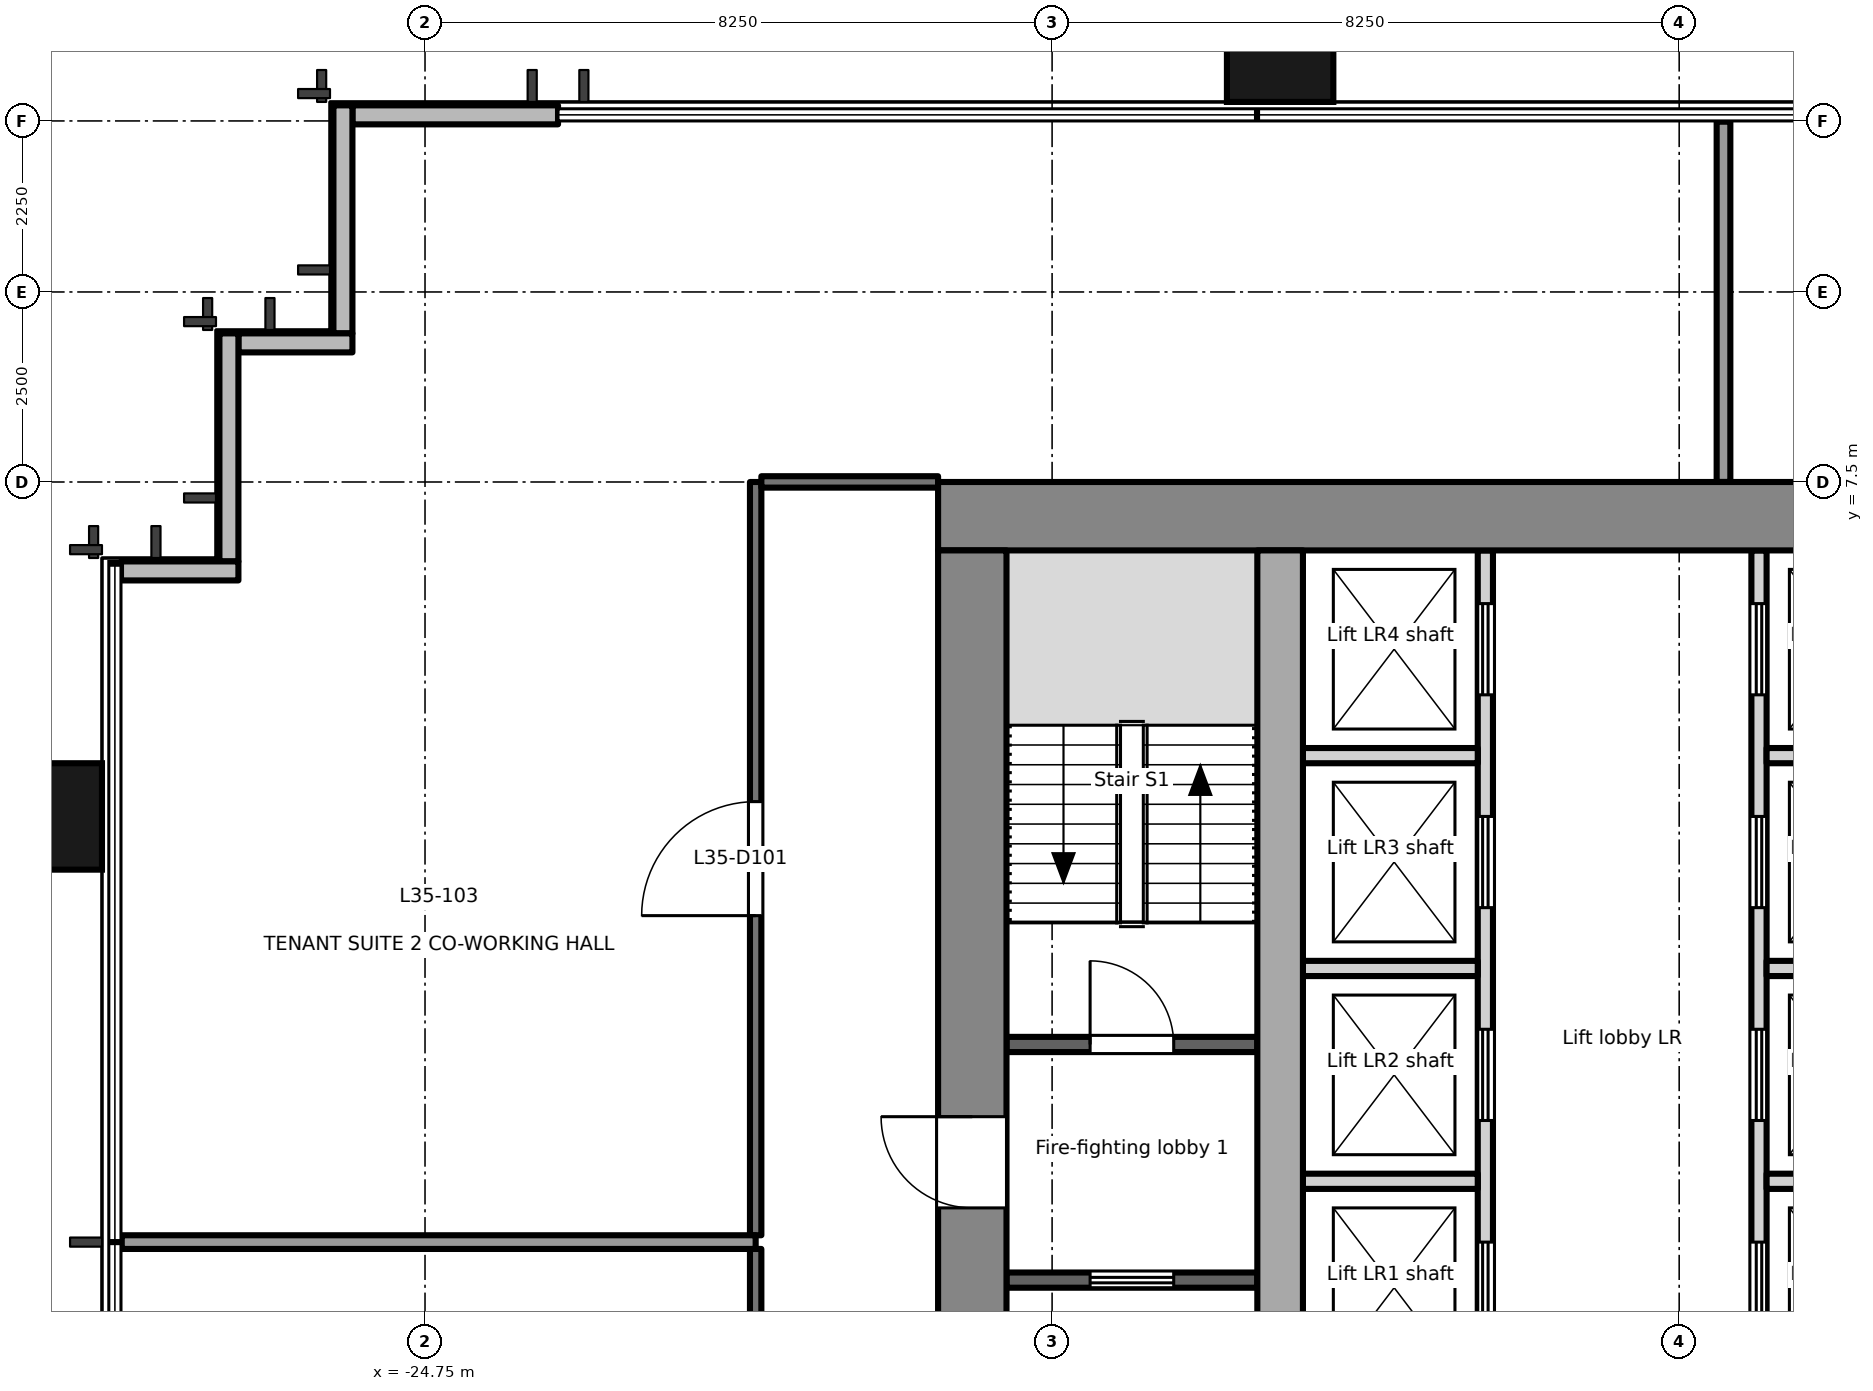
"""IFC4 building model, lengths in metres.
Left out: names, types, materials, properties, quantities, classifications, styles, units other than length and angle.
Written with IfcOpenShell. Run it as: python <this file> out.ifc"""

import sys

from ifc_helpers import new_model, si_unit, direction, frame, frame_2d, origin, origin_2d, place, context, subcontext, project, spatial, rectangle, extrude, element, fill, save


model = new_model("IFC4")
c1 = context("Model", 3, precision=1e-05, world=origin(), true_north=direction((0.0, 1.0)))
c2 = subcontext(c1, "Body", "Model", "MODEL_VIEW")
j1 = project(units=[si_unit("LENGTHUNIT", "METRE"), si_unit("PLANEANGLEUNIT", "RADIAN")], contexts=[c1])
p1 = place(None, origin())
s1 = spatial("IfcSite", under=j1, at=p1, CompositionType="ELEMENT")
p2 = place(p1, origin())
s2 = spatial("IfcBuilding", under=s1, at=p2, CompositionType="ELEMENT")
p3 = place(p2, frame((0.0, 0.0, 154.1)))
s3 = spatial("IfcBuildingStorey", under=s2, at=p3, CompositionType="ELEMENT", Elevation=154.1)
for number, where, z_axis, x_axis in (
    (1, (-29.9, 3.1, -0.2), (0.0, 0.0, 1.0), (0.0, 1.0, 0.0)),
    (2, (-13.5, 13.4, -0.2), (0.0, 0.0, 1.0), (1.0, 0.0, 0.0)),
):
    element("IfcColumn", number, at=place(p3, frame(where, z_axis=z_axis, x_axis=x_axis)), inside=s3, PredefinedType="COLUMN", context=c2, shape_type="SweptSolid", body=[
        extrude(rectangle(XDim=1.4, YDim=1.8, at=origin_2d()), origin(), (0.0, 0.0, 1.0), 4.0),
    ])
p4 = place(p3, frame((-23.0, 12.33, 0.0), z_axis=(0.0, 0.0, 1.0), x_axis=(-1.0, 0.0, 0.0)))
e3 = element("IfcWall", 3, at=p4, inside=s3, PredefinedType="SOLIDWALL", context=c2, shape_type="SweptSolid", body=[
    extrude(rectangle(XDim=2.705, YDim=0.25, at=frame_2d((1.353, 0.0))), origin(), (0.0, 0.0, 1.0), 3.8),
])
p5 = place(p3, frame((-25.83, 12.455, 0.0), z_axis=(0.0, 0.0, 1.0), x_axis=(0.0, -1.0, 0.0)))
e4 = element("IfcWall", 4, at=p5, inside=s3, PredefinedType="SOLIDWALL", context=c2, shape_type="SweptSolid", body=[
    extrude(rectangle(XDim=3.0, YDim=0.25, at=frame_2d((1.5, 0.0))), origin(), (0.0, 0.0, 1.0), 3.8),
])
p6 = place(p3, frame((-25.705, 9.33, 0.0), z_axis=(0.0, 0.0, 1.0), x_axis=(-1.0, 0.0, 0.0)))
e5 = element("IfcWall", 5, at=p6, inside=s3, PredefinedType="SOLIDWALL", context=c2, shape_type="SweptSolid", body=[
    extrude(rectangle(XDim=1.5, YDim=0.25, at=frame_2d((0.75, 0.0))), origin(), (0.0, 0.0, 1.0), 3.8),
])
p7 = place(p3, frame((-27.33, 9.455, 0.0), z_axis=(0.0, 0.0, 1.0), x_axis=(0.0, -1.0, 0.0)))
e6 = element("IfcWall", 6, at=p7, inside=s3, PredefinedType="SOLIDWALL", context=c2, shape_type="SweptSolid", body=[
    extrude(rectangle(XDim=3.0, YDim=0.25, at=frame_2d((1.5, 0.0))), origin(), (0.0, 0.0, 1.0), 3.8),
])
p8 = place(p3, frame((-27.205, 6.33, 0.0), z_axis=(0.0, 0.0, 1.0), x_axis=(-1.0, 0.0, 0.0)))
e7 = element("IfcWall", 7, at=p8, inside=s3, PredefinedType="SOLIDWALL", context=c2, shape_type="SweptSolid", body=[
    extrude(rectangle(XDim=1.545, YDim=0.25, at=frame_2d((0.772, 0.0))), origin(), (0.0, 0.0, 1.0), 3.8),
])
p9 = place(p3, frame((-18.0, 7.05, -0.2), z_axis=(0.0, 0.0, 1.0), x_axis=(1.0, 0.0, 0.0)))
e8 = element("IfcWall", 8, at=p9, inside=s3, PredefinedType="SHEAR", context=c2, shape_type="SweptSolid", body=[
    extrude(rectangle(XDim=36.0, YDim=0.9, at=frame_2d((18.0, 0.0))), origin(), (0.0, 0.0, 1.0), 4.0),
])
p10 = place(p3, frame((-17.55, -6.6, -0.2), z_axis=(0.0, 0.0, 1.0), x_axis=(0.0, 1.0, 0.0)))
e9 = element("IfcWall", 9, at=p10, inside=s3, PredefinedType="SHEAR", context=c2, shape_type="SweptSolid", body=[
    extrude(rectangle(XDim=13.2, YDim=0.9, at=frame_2d((6.6, 0.0))), origin(), (0.0, 0.0, 1.0), 4.0),
])
p11 = place(p10, frame((4.55, 0.0, 0.2)))
e10 = element("IfcOpeningElement", 10, at=p11, cuts=e9, PredefinedType="OPENING", context=c2, shape_type="SweptSolid", body=[
    extrude(rectangle(XDim=1.2, YDim=2.1, at=frame_2d((0.6, 1.05))), frame((0.0, 0.46, 0.0), z_axis=(0.0, -1.0, 0.0), x_axis=(1.0, 0.0, 0.0)), (0.0, 0.0, 1.0), 0.921),
])
p12 = place(p3, frame((-13.5, -6.6, -0.2), z_axis=(0.0, 0.0, 1.0), x_axis=(0.0, 1.0, 0.0)))
e11 = element("IfcWall", 11, at=p12, inside=s3, PredefinedType="SHEAR", context=c2, shape_type="SweptSolid", body=[
    extrude(rectangle(XDim=13.2, YDim=0.6, at=frame_2d((6.6, 0.0))), origin(), (0.0, 0.0, 1.0), 4.0),
])
p13 = place(p3, frame((-17.1, -3.0, 0.0), z_axis=(0.0, 0.0, 1.0), x_axis=(1.0, 0.0, 0.0)))
e12 = element("IfcWall", 12, at=p13, inside=s3, PredefinedType="PARTITIONING", context=c2, shape_type="SweptSolid", body=[
    extrude(rectangle(XDim=3.3, YDim=0.2, at=frame_2d((1.65, 0.0))), origin(), (0.0, 0.0, 1.0), 3.8),
])
p14 = place(p13, frame((1.1, 0.0, 0.0)))
e13 = element("IfcOpeningElement", 13, at=p14, cuts=e12, PredefinedType="OPENING", context=c2, shape_type="SweptSolid", body=[
    extrude(rectangle(XDim=1.1, YDim=2.1, at=frame_2d((0.55, 1.05))), frame((0.0, 0.111, 0.0), z_axis=(0.0, -1.0, 0.0), x_axis=(1.0, 0.0, 0.0)), (0.0, 0.0, 1.0), 0.221),
])
p15 = place(p3, frame((-17.1, 0.1, 0.0), z_axis=(0.0, 0.0, 1.0), x_axis=(1.0, 0.0, 0.0)))
e14 = element("IfcWall", 14, at=p15, inside=s3, PredefinedType="PARTITIONING", context=c2, shape_type="SweptSolid", body=[
    extrude(rectangle(XDim=3.3, YDim=0.2, at=frame_2d((1.65, 0.0))), origin(), (0.0, 0.0, 1.0), 3.8),
])
p16 = place(p15, frame((1.1, 0.0, 0.0)))
e15 = element("IfcOpeningElement", 15, at=p16, cuts=e14, PredefinedType="OPENING", context=c2, shape_type="SweptSolid", body=[
    extrude(rectangle(XDim=1.1, YDim=2.1, at=frame_2d((0.55, 1.05))), frame((0.0, 0.111, 0.0), z_axis=(0.0, -1.0, 0.0), x_axis=(1.0, 0.0, 0.0)), (0.0, 0.0, 1.0), 0.221),
])
p17 = place(p3, frame((-10.8, -6.6, 0.0), z_axis=(0.0, 0.0, 1.0), x_axis=(0.0, 1.0, 0.0)))
e16 = element("IfcWall", 16, at=p17, inside=s3, PredefinedType="PARTITIONING", context=c2, shape_type="SweptSolid", body=[
    extrude(rectangle(XDim=13.2, YDim=0.2, at=frame_2d((6.6, 0.0))), origin(), (0.0, 0.0, 1.0), 3.8),
])
p18 = place(p17, frame((0.55, 0.0, 0.0)))
e17 = element("IfcOpeningElement", 17, at=p18, cuts=e16, PredefinedType="OPENING", context=c2, shape_type="SweptSolid", body=[
    extrude(rectangle(XDim=0.9, YDim=2.1, at=frame_2d((0.45, 1.05))), frame((0.0, 0.111, 0.0), z_axis=(0.0, -1.0, 0.0), x_axis=(1.0, 0.0, 0.0)), (0.0, 0.0, 1.0), 0.221),
])
p19 = place(p17, frame((2.9, 0.0, 0.0)))
e18 = element("IfcOpeningElement", 18, at=p19, cuts=e16, PredefinedType="OPENING", context=c2, shape_type="SweptSolid", body=[
    extrude(rectangle(XDim=1.2, YDim=2.1, at=frame_2d((0.6, 1.05))), frame((0.0, 0.111, 0.0), z_axis=(0.0, -1.0, 0.0), x_axis=(1.0, 0.0, 0.0)), (0.0, 0.0, 1.0), 0.221),
])
p20 = place(p17, frame((5.7, 0.0, 0.0)))
e19 = element("IfcOpeningElement", 19, at=p20, cuts=e16, PredefinedType="OPENING", context=c2, shape_type="SweptSolid", body=[
    extrude(rectangle(XDim=1.2, YDim=2.1, at=frame_2d((0.6, 1.05))), frame((0.0, 0.111, 0.0), z_axis=(0.0, -1.0, 0.0), x_axis=(1.0, 0.0, 0.0)), (0.0, 0.0, 1.0), 0.221),
])
p21 = place(p17, frame((8.5, 0.0, 0.0)))
e20 = element("IfcOpeningElement", 20, at=p21, cuts=e16, PredefinedType="OPENING", context=c2, shape_type="SweptSolid", body=[
    extrude(rectangle(XDim=1.2, YDim=2.1, at=frame_2d((0.6, 1.05))), frame((0.0, 0.111, 0.0), z_axis=(0.0, -1.0, 0.0), x_axis=(1.0, 0.0, 0.0)), (0.0, 0.0, 1.0), 0.221),
])
p22 = place(p17, frame((11.3, 0.0, 0.0)))
e21 = element("IfcOpeningElement", 21, at=p22, cuts=e16, PredefinedType="OPENING", context=c2, shape_type="SweptSolid", body=[
    extrude(rectangle(XDim=1.2, YDim=2.1, at=frame_2d((0.6, 1.05))), frame((0.0, 0.111, 0.0), z_axis=(0.0, -1.0, 0.0), x_axis=(1.0, 0.0, 0.0)), (0.0, 0.0, 1.0), 0.221),
])
p23 = place(p3, frame((-7.2, -6.6, 0.0), z_axis=(0.0, 0.0, 1.0), x_axis=(0.0, 1.0, 0.0)))
e22 = element("IfcWall", 22, at=p23, inside=s3, PredefinedType="PARTITIONING", context=c2, shape_type="SweptSolid", body=[
    extrude(rectangle(XDim=13.2, YDim=0.2, at=frame_2d((6.6, 0.0))), origin(), (0.0, 0.0, 1.0), 3.8),
])
p24 = place(p23, frame((0.55, 0.0, 0.0)))
e23 = element("IfcOpeningElement", 23, at=p24, cuts=e22, PredefinedType="OPENING", context=c2, shape_type="SweptSolid", body=[
    extrude(rectangle(XDim=0.9, YDim=2.1, at=frame_2d((0.45, 1.05))), frame((0.0, 0.111, 0.0), z_axis=(0.0, -1.0, 0.0), x_axis=(1.0, 0.0, 0.0)), (0.0, 0.0, 1.0), 0.221),
])
p25 = place(p23, frame((2.9, 0.0, 0.0)))
e24 = element("IfcOpeningElement", 24, at=p25, cuts=e22, PredefinedType="OPENING", context=c2, shape_type="SweptSolid", body=[
    extrude(rectangle(XDim=1.2, YDim=2.1, at=frame_2d((0.6, 1.05))), frame((0.0, 0.111, 0.0), z_axis=(0.0, -1.0, 0.0), x_axis=(1.0, 0.0, 0.0)), (0.0, 0.0, 1.0), 0.221),
])
p26 = place(p23, frame((5.7, 0.0, 0.0)))
e25 = element("IfcOpeningElement", 25, at=p26, cuts=e22, PredefinedType="OPENING", context=c2, shape_type="SweptSolid", body=[
    extrude(rectangle(XDim=1.2, YDim=2.1, at=frame_2d((0.6, 1.05))), frame((0.0, 0.111, 0.0), z_axis=(0.0, -1.0, 0.0), x_axis=(1.0, 0.0, 0.0)), (0.0, 0.0, 1.0), 0.221),
])
p27 = place(p23, frame((8.5, 0.0, 0.0)))
e26 = element("IfcOpeningElement", 26, at=p27, cuts=e22, PredefinedType="OPENING", context=c2, shape_type="SweptSolid", body=[
    extrude(rectangle(XDim=1.2, YDim=2.1, at=frame_2d((0.6, 1.05))), frame((0.0, 0.111, 0.0), z_axis=(0.0, -1.0, 0.0), x_axis=(1.0, 0.0, 0.0)), (0.0, 0.0, 1.0), 0.221),
])
p28 = place(p23, frame((11.3, 0.0, 0.0)))
e27 = element("IfcOpeningElement", 27, at=p28, cuts=e22, PredefinedType="OPENING", context=c2, shape_type="SweptSolid", body=[
    extrude(rectangle(XDim=1.2, YDim=2.1, at=frame_2d((0.6, 1.05))), frame((0.0, 0.111, 0.0), z_axis=(0.0, -1.0, 0.0), x_axis=(1.0, 0.0, 0.0)), (0.0, 0.0, 1.0), 0.221),
])
for number, where, z_axis, x_axis in (
    (28, (-13.2, -1.7, 0.0), (0.0, 0.0, 1.0), (1.0, 0.0, 0.0)),
    (29, (-13.2, 1.1, 0.0), (0.0, 0.0, 1.0), (1.0, 0.0, 0.0)),
    (30, (-13.2, 3.9, 0.0), (0.0, 0.0, 1.0), (1.0, 0.0, 0.0)),
    (31, (-7.1, -1.7, 0.0), (0.0, 0.0, 1.0), (1.0, 0.0, 0.0)),
    (32, (-7.1, 1.1, 0.0), (0.0, 0.0, 1.0), (1.0, 0.0, 0.0)),
    (33, (-7.1, 3.9, 0.0), (0.0, 0.0, 1.0), (1.0, 0.0, 0.0)),
):
    element("IfcWall", number, at=place(p3, frame(where, z_axis=z_axis, x_axis=x_axis)), inside=s3, PredefinedType="PARTITIONING", context=c2, shape_type="SweptSolid", body=[
        extrude(rectangle(XDim=2.3, YDim=0.2, at=frame_2d((1.15, 0.0))), origin(), (0.0, 0.0, 1.0), 3.8),
    ])
p29 = place(p3, frame((-20.4, -10.78, 0.0), z_axis=(0.0, 0.0, 1.0), x_axis=(0.0, 1.0, 0.0)))
e34 = element("IfcWall", 34, at=p29, inside=s3, PredefinedType="PARTITIONING", context=c2, shape_type="SweptSolid", body=[
    extrude(rectangle(XDim=8.19, YDim=0.15, at=frame_2d((4.095, 0.0))), origin(), (0.0, 0.0, 1.0), 3.3),
])
p30 = place(p29, frame((3.645, 0.0, 0.0)))
e35 = element("IfcOpeningElement", 35, at=p30, cuts=e34, PredefinedType="OPENING", context=c2, shape_type="SweptSolid", body=[
    extrude(rectangle(XDim=0.9, YDim=2.1, at=frame_2d((0.45, 1.05))), frame((0.0, 0.085, 0.0), z_axis=(0.0, -1.0, 0.0), x_axis=(1.0, 0.0, 0.0)), (0.0, 0.0, 1.0), 0.171),
])
p31 = place(p3, frame((-20.4, -2.41, 0.0), z_axis=(0.0, 0.0, 1.0), x_axis=(0.0, 1.0, 0.0)))
e36 = element("IfcWall", 36, at=p31, inside=s3, PredefinedType="PARTITIONING", context=c2, shape_type="SweptSolid", body=[
    extrude(rectangle(XDim=9.91, YDim=0.15, at=frame_2d((4.955, 0.0))), origin(), (0.0, 0.0, 1.0), 3.3),
])
p32 = place(p31, frame((4.205, 0.0, 0.0)))
e37 = element("IfcOpeningElement", 37, at=p32, cuts=e36, PredefinedType="OPENING", context=c2, shape_type="SweptSolid", body=[
    extrude(rectangle(XDim=1.5, YDim=2.1, at=frame_2d((0.75, 1.05))), frame((0.0, 0.085, 0.0), z_axis=(0.0, -1.0, 0.0), x_axis=(1.0, 0.0, 0.0)), (0.0, 0.0, 1.0), 0.171),
])
p33 = place(p3, frame((-20.325, 7.501, 0.0), z_axis=(0.0, 0.0, 1.0), x_axis=(1.0, 0.0, 0.0)))
e38 = element("IfcWall", 38, at=p33, inside=s3, PredefinedType="PARTITIONING", context=c2, shape_type="SweptSolid", body=[
    extrude(rectangle(XDim=2.325, YDim=0.15, at=frame_2d((1.163, 0.0))), origin(), (0.0, 0.0, 1.0), 3.8),
])
p34 = place(p3, frame((-28.74, -2.5, 0.0), z_axis=(0.0, 0.0, 1.0), x_axis=(1.0, 0.0, 0.0)))
e39 = element("IfcWall", 39, at=p34, inside=s3, PredefinedType="PARTITIONING", context=c2, shape_type="SweptSolid", body=[
    extrude(rectangle(XDim=8.34, YDim=0.18, at=frame_2d((4.17, 0.0))), origin(), (0.0, 0.0, 1.0), 3.8),
])
p35 = place(p3, frame((-7.667, 12.24, 0.0), z_axis=(0.0, 0.0, 1.0), x_axis=(0.0, -1.0, 0.0)))
e40 = element("IfcWall", 40, at=p35, inside=s3, PredefinedType="PARTITIONING", context=c2, shape_type="SweptSolid", body=[
    extrude(rectangle(XDim=4.74, YDim=0.18, at=frame_2d((2.37, 0.0))), origin(), (0.0, 0.0, 1.0), 3.8),
])
p36 = place(p14, origin())
e41 = element("IfcDoor", 41, at=p36, inside=s3, OperationType="DOUBLE_DOOR_SLIDING", PredefinedType="DOOR", context=c2, shape_type="SweptSolid", body=[
    extrude(rectangle(XDim=1.1, YDim=2.1, at=frame_2d((0.55, 1.05))), frame((0.0, 0.025, 0.0), z_axis=(0.0, -1.0, 0.0), x_axis=(1.0, 0.0, 0.0)), (0.0, 0.0, 1.0), 0.05),
])
fill(e13, e41)
p37 = place(p11, origin())
e42 = element("IfcDoor", 42, at=p37, inside=s3, OperationType="SINGLE_SWING_RIGHT", PredefinedType="DOOR", context=c2, shape_type="SweptSolid", body=[
    extrude(rectangle(XDim=1.2, YDim=2.1, at=frame_2d((0.6, 1.05))), frame((0.0, 0.025, 0.0), z_axis=(0.0, -1.0, 0.0), x_axis=(1.0, 0.0, 0.0)), (0.0, 0.0, 1.0), 0.05),
])
fill(e10, e42)
p38 = place(p16, origin())
e43 = element("IfcDoor", 43, at=p38, inside=s3, OperationType="SINGLE_SWING_LEFT", PredefinedType="DOOR", context=c2, shape_type="SweptSolid", body=[
    extrude(rectangle(XDim=1.1, YDim=2.1, at=frame_2d((0.55, 1.05))), frame((0.0, 0.025, 0.0), z_axis=(0.0, -1.0, 0.0), x_axis=(1.0, 0.0, 0.0)), (0.0, 0.0, 1.0), 0.05),
])
fill(e15, e43)
p39 = place(p19, origin())
e44 = element("IfcDoor", 44, at=p39, inside=s3, OperationType="DOUBLE_DOOR_SLIDING", PredefinedType="DOOR", context=c2, shape_type="SweptSolid", body=[
    extrude(rectangle(XDim=1.2, YDim=2.1, at=frame_2d((0.6, 1.05))), frame((0.0, 0.025, 0.0), z_axis=(0.0, -1.0, 0.0), x_axis=(1.0, 0.0, 0.0)), (0.0, 0.0, 1.0), 0.05),
])
fill(e18, e44)
p40 = place(p20, origin())
e45 = element("IfcDoor", 45, at=p40, inside=s3, OperationType="DOUBLE_DOOR_SLIDING", PredefinedType="DOOR", context=c2, shape_type="SweptSolid", body=[
    extrude(rectangle(XDim=1.2, YDim=2.1, at=frame_2d((0.6, 1.05))), frame((0.0, 0.025, 0.0), z_axis=(0.0, -1.0, 0.0), x_axis=(1.0, 0.0, 0.0)), (0.0, 0.0, 1.0), 0.05),
])
fill(e19, e45)
p41 = place(p21, origin())
e46 = element("IfcDoor", 46, at=p41, inside=s3, OperationType="DOUBLE_DOOR_SLIDING", PredefinedType="DOOR", context=c2, shape_type="SweptSolid", body=[
    extrude(rectangle(XDim=1.2, YDim=2.1, at=frame_2d((0.6, 1.05))), frame((0.0, 0.025, 0.0), z_axis=(0.0, -1.0, 0.0), x_axis=(1.0, 0.0, 0.0)), (0.0, 0.0, 1.0), 0.05),
])
fill(e20, e46)
p42 = place(p22, origin())
e47 = element("IfcDoor", 47, at=p42, inside=s3, OperationType="DOUBLE_DOOR_SLIDING", PredefinedType="DOOR", context=c2, shape_type="SweptSolid", body=[
    extrude(rectangle(XDim=1.2, YDim=2.1, at=frame_2d((0.6, 1.05))), frame((0.0, 0.025, 0.0), z_axis=(0.0, -1.0, 0.0), x_axis=(1.0, 0.0, 0.0)), (0.0, 0.0, 1.0), 0.05),
])
fill(e21, e47)
p43 = place(p25, origin())
e48 = element("IfcDoor", 48, at=p43, inside=s3, OperationType="DOUBLE_DOOR_SLIDING", PredefinedType="DOOR", context=c2, shape_type="SweptSolid", body=[
    extrude(rectangle(XDim=1.2, YDim=2.1, at=frame_2d((0.6, 1.05))), frame((0.0, 0.025, 0.0), z_axis=(0.0, -1.0, 0.0), x_axis=(1.0, 0.0, 0.0)), (0.0, 0.0, 1.0), 0.05),
])
fill(e24, e48)
p44 = place(p26, origin())
e49 = element("IfcDoor", 49, at=p44, inside=s3, OperationType="DOUBLE_DOOR_SLIDING", PredefinedType="DOOR", context=c2, shape_type="SweptSolid", body=[
    extrude(rectangle(XDim=1.2, YDim=2.1, at=frame_2d((0.6, 1.05))), frame((0.0, 0.025, 0.0), z_axis=(0.0, -1.0, 0.0), x_axis=(1.0, 0.0, 0.0)), (0.0, 0.0, 1.0), 0.05),
])
fill(e25, e49)
p45 = place(p27, origin())
e50 = element("IfcDoor", 50, at=p45, inside=s3, OperationType="DOUBLE_DOOR_SLIDING", PredefinedType="DOOR", context=c2, shape_type="SweptSolid", body=[
    extrude(rectangle(XDim=1.2, YDim=2.1, at=frame_2d((0.6, 1.05))), frame((0.0, 0.025, 0.0), z_axis=(0.0, -1.0, 0.0), x_axis=(1.0, 0.0, 0.0)), (0.0, 0.0, 1.0), 0.05),
])
fill(e26, e50)
p46 = place(p28, origin())
e51 = element("IfcDoor", 51, at=p46, inside=s3, OperationType="DOUBLE_DOOR_SLIDING", PredefinedType="DOOR", context=c2, shape_type="SweptSolid", body=[
    extrude(rectangle(XDim=1.2, YDim=2.1, at=frame_2d((0.6, 1.05))), frame((0.0, 0.025, 0.0), z_axis=(0.0, -1.0, 0.0), x_axis=(1.0, 0.0, 0.0)), (0.0, 0.0, 1.0), 0.05),
])
fill(e27, e51)
p47 = place(p32, origin())
e52 = element("IfcDoor", 52, at=p47, inside=s3, OperationType="DOUBLE_DOOR_SINGLE_SWING", PredefinedType="DOOR", context=c2, shape_type="SweptSolid", body=[
    extrude(rectangle(XDim=1.5, YDim=2.1, at=frame_2d((0.75, 1.05))), frame((0.0, 0.025, 0.0), z_axis=(0.0, -1.0, 0.0), x_axis=(1.0, 0.0, 0.0)), (0.0, 0.0, 1.0), 0.05),
])
fill(e37, e52)
save(model, sys.argv[1])
